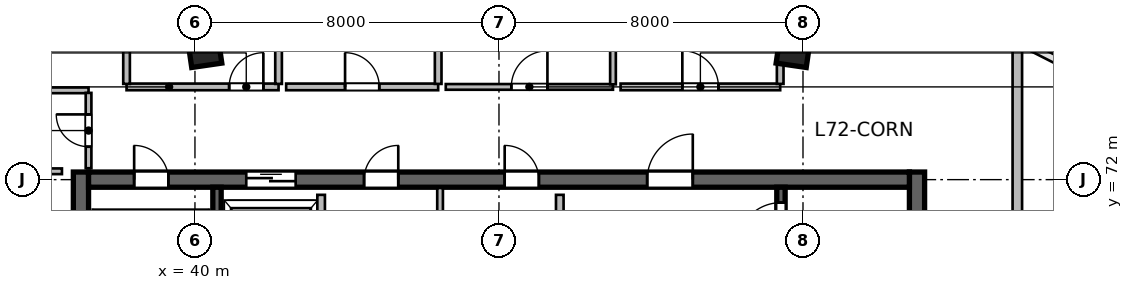
"""IFC4 building model, lengths in metres.
Left out: names, types, materials, properties, quantities, classifications, styles, units other than length and angle.
Written with IfcOpenShell. Run it as: python <this file> out.ifc"""

import sys

from ifc_helpers import new_model, si_unit, direction, frame, frame_2d, origin, origin_2d, place, context, subcontext, project, spatial, rectangle, extrude, source, transform, mapped, element, fill, save


model = new_model("IFC4")
c1 = context("Model", 3, precision=1e-05, world=origin(), true_north=direction((0.0, 1.0)))
c2 = subcontext(c1, "Body", "Model", "MODEL_VIEW")
j1 = project(units=[si_unit("LENGTHUNIT", "METRE"), si_unit("PLANEANGLEUNIT", "RADIAN")], contexts=[c1])
p1 = place(None, origin())
s1 = spatial("IfcSite", under=j1, at=p1, CompositionType="ELEMENT")
p2 = place(p1, origin())
s2 = spatial("IfcBuilding", under=s1, at=p2, CompositionType="ELEMENT")
p3 = place(p2, frame((0.0, 0.0, 295.2)))
s3 = spatial("IfcBuildingStorey", under=s2, at=p3, CompositionType="ELEMENT", Elevation=295.2)
m1 = source(origin(), c2, "Body", "SweptSolid", [
    extrude(rectangle(XDim=12.0, YDim=0.4, at=frame_2d((6.0, 0.0))), origin(), (0.0, 0.0, 1.0), 3.9),
])
for number, where, z_axis, x_axis in (
    (1, (37.0, 60.2, 0.0), (0.0, 0.0, 1.0), (0.0, 1.0, 0.0)),
    (2, (59.0, 60.2, 0.0), (0.0, 0.0, 1.0), (0.0, 1.0, 0.0)),
):
    element("IfcWall", number, at=place(p3, frame(where, z_axis=z_axis, x_axis=x_axis)), inside=s3, PredefinedType="SHEAR", context=c2, shape_type="MappedRepresentation", body=[
        mapped(m1, transform((0.0, 0.0, 0.0), scale=1.0)),
    ])
m2 = source(origin(), c2, "Body", "SweptSolid", [
    extrude(rectangle(XDim=21.6, YDim=0.4, at=frame_2d((10.8, 0.0))), origin(), (0.0, 0.0, 1.0), 3.9),
])
p4 = place(p3, frame((37.2, 72.0, 0.0), z_axis=(0.0, 0.0, 1.0), x_axis=(1.0, 0.0, 0.0)))
e3 = element("IfcWall", 3, at=p4, inside=s3, PredefinedType="SHEAR", context=c2, shape_type="MappedRepresentation", body=[
    mapped(m2, transform((0.0, 0.0, 0.0), scale=1.0)),
])
p5 = place(p4, frame((1.2, 0.0, 0.0)))
e4 = element("IfcOpeningElement", 4, at=p5, cuts=e3, PredefinedType="OPENING", context=c2, shape_type="SweptSolid", body=[
    extrude(rectangle(XDim=0.9, YDim=2.1, at=frame_2d((0.45, 1.05))), frame((0.0, 0.21, 0.0), z_axis=(0.0, -1.0, 0.0), x_axis=(1.0, 0.0, 0.0)), (0.0, 0.0, 1.0), 0.42),
])
p6 = place(p4, frame((14.7, 0.0, 0.0)))
e5 = element("IfcOpeningElement", 5, at=p6, cuts=e3, PredefinedType="OPENING", context=c2, shape_type="SweptSolid", body=[
    extrude(rectangle(XDim=1.2, YDim=2.15, at=frame_2d((0.6, 1.075))), frame((0.0, 0.21, 0.0), z_axis=(0.0, -1.0, 0.0), x_axis=(1.0, 0.0, 0.0)), (0.0, 0.0, 1.0), 0.42),
])
p7 = place(p4, frame((4.15, 0.0, 0.0)))
e6 = element("IfcOpeningElement", 6, at=p7, cuts=e3, PredefinedType="OPENING", context=c2, shape_type="SweptSolid", body=[
    extrude(rectangle(XDim=1.3, YDim=2.15, at=frame_2d((0.65, 1.075))), frame((0.0, 0.21, 0.0), z_axis=(0.0, -1.0, 0.0), x_axis=(1.0, 0.0, 0.0)), (0.0, 0.0, 1.0), 0.42),
])
p8 = place(p4, frame((7.25, 0.0, 0.0)))
e7 = element("IfcOpeningElement", 7, at=p8, cuts=e3, PredefinedType="OPENING", context=c2, shape_type="SweptSolid", body=[
    extrude(rectangle(XDim=0.9, YDim=2.1, at=frame_2d((0.45, 1.05))), frame((0.0, 0.21, 0.0), z_axis=(0.0, -1.0, 0.0), x_axis=(1.0, 0.0, 0.0)), (0.0, 0.0, 1.0), 0.42),
])
p9 = place(p4, frame((10.95, 0.0, 0.0)))
e8 = element("IfcOpeningElement", 8, at=p9, cuts=e3, PredefinedType="OPENING", context=c2, shape_type="SweptSolid", body=[
    extrude(rectangle(XDim=0.9, YDim=2.1, at=frame_2d((0.45, 1.05))), frame((0.0, 0.21, 0.0), z_axis=(0.0, -1.0, 0.0), x_axis=(1.0, 0.0, 0.0)), (0.0, 0.0, 1.0), 0.42),
])
m3 = source(origin(), c2, "Body", "SweptSolid", [
    extrude(rectangle(XDim=11.2, YDim=0.22, at=frame_2d((5.6, 0.0))), origin(), (0.0, 0.0, 1.0), 3.9),
])
p10 = place(p3, frame((40.58, 60.6, 0.0), z_axis=(0.0, 0.0, 1.0), x_axis=(0.0, 1.0, 0.0)))
e9 = element("IfcWall", 9, at=p10, inside=s3, PredefinedType="SHEAR", context=c2, shape_type="MappedRepresentation", body=[
    mapped(m3, transform((0.0, 0.0, 0.0), scale=1.0)),
])
p11 = place(p3, frame((55.42, 60.6, 0.0), z_axis=(0.0, 0.0, 1.0), x_axis=(0.0, 1.0, 0.0)))
e10 = element("IfcWall", 10, at=p11, inside=s3, PredefinedType="SHEAR", context=c2, shape_type="MappedRepresentation", body=[
    mapped(m3, transform((0.0, 0.0, 0.0), scale=1.0)),
])
p12 = place(p11, frame((9.645, 0.0, 0.0)))
e11 = element("IfcOpeningElement", 11, at=p12, cuts=e10, PredefinedType="OPENING", context=c2, shape_type="SweptSolid", body=[
    extrude(rectangle(XDim=1.15, YDim=2.15, at=frame_2d((0.575, 1.075))), frame((0.0, 0.12, 0.0), z_axis=(0.0, -1.0, 0.0), x_axis=(1.0, 0.0, 0.0)), (0.0, 0.0, 1.0), 0.24),
])
m4 = source(origin(), c2, "Body", "SweptSolid", [
    extrude(rectangle(XDim=0.8, YDim=0.8, at=origin_2d()), origin(), (0.0, 0.0, 1.0), 3.9),
])
for number, where, z_axis, x_axis in (
    (12, (40.253, 75.404, 0.0), (0.0, 0.0, 1.0), (-0.143, 0.99, 0.0)),
    (13, (55.747, 75.404, 0.0), (0.0, 0.0, 1.0), (0.143, 0.99, 0.0)),
):
    element("IfcColumn", number, at=place(p3, frame(where, z_axis=z_axis, x_axis=x_axis)), inside=s3, PredefinedType="COLUMN", context=c2, shape_type="MappedRepresentation", body=[
        mapped(m4, transform((0.0, 0.0, 0.0), scale=1.0)),
    ])
m5 = source(origin(), c2, "Body", "SweptSolid", [
    extrude(rectangle(XDim=2.673, YDim=0.28, at=frame_2d((1.337, 0.0))), origin(), (0.0, 0.0, 1.0), 3.64),
])
p13 = place(p3, frame((33.907, 75.458, 0.0), z_axis=(0.0, 0.0, 1.0), x_axis=(0.919036345912, 0.394172798266, 0.0)))
e14 = element("IfcWall", 14, at=p13, inside=s3, PredefinedType="SOLIDWALL", context=c2, shape_type="MappedRepresentation", body=[
    mapped(m5, transform((0.0, 0.0, 0.0), scale=1.0)),
])
m6 = source(origin(), c2, "Body", "SweptSolid", [
    extrude(rectangle(XDim=5.8, YDim=0.2, at=frame_2d((2.9, 0.0))), origin(), (0.0, 0.0, 1.0), 3.64),
])
p14 = place(p3, frame((49.6, 65.8, 0.0), z_axis=(0.0, 0.0, 1.0), x_axis=(0.0, 1.0, 0.0)))
e15 = element("IfcWall", 15, at=p14, inside=s3, PredefinedType="SOLIDWALL", context=c2, shape_type="MappedRepresentation", body=[
    mapped(m6, transform((0.0, 0.0, 0.0), scale=1.0)),
])
m7 = source(origin(), c2, "Body", "SweptSolid", [
    extrude(rectangle(XDim=3.2, YDim=0.2, at=frame_2d((1.6, 0.0))), origin(), (0.0, 0.0, 1.0), 3.64),
])
p15 = place(p3, frame((43.32, 68.4, 0.0), z_axis=(0.0, 0.0, 1.0), x_axis=(0.0, 1.0, 0.0)))
e16 = element("IfcWall", 16, at=p15, inside=s3, PredefinedType="SOLIDWALL", context=c2, shape_type="MappedRepresentation", body=[
    mapped(m7, transform((0.0, 0.0, 0.0), scale=1.0)),
])
m8 = source(origin(), c2, "Body", "SweptSolid", [
    extrude(rectangle(XDim=3.38, YDim=0.15, at=frame_2d((1.69, 0.0))), origin(), (0.0, 0.0, 1.0), 3.64),
])
p16 = place(p3, frame((46.45, 68.4, 0.0), z_axis=(0.0, 0.0, 1.0), x_axis=(0.0, 1.0, 0.0)))
e17 = element("IfcWall", 17, at=p16, inside=s3, PredefinedType="PARTITIONING", context=c2, shape_type="MappedRepresentation", body=[
    mapped(m8, transform((0.0, 0.0, 0.0), scale=1.0)),
])
m9 = source(origin(), c2, "Body", "SweptSolid", [
    extrude(rectangle(XDim=2.1, YDim=0.15, at=frame_2d((1.05, 0.0))), origin(), (0.0, 0.0, 1.0), 3.64),
])
p17 = place(p3, frame((34.4, 72.22, 0.0), z_axis=(0.0, 0.0, 1.0), x_axis=(1.0, 0.0, 0.0)))
e18 = element("IfcWall", 18, at=p17, inside=s3, PredefinedType="PARTITIONING", context=c2, shape_type="MappedRepresentation", body=[
    mapped(m9, transform((0.0, 0.0, 0.0), scale=1.0)),
])
m10 = source(origin(), c2, "Body", "SweptSolid", [
    extrude(rectangle(XDim=2.8, YDim=0.15, at=frame_2d((1.4, 0.0))), origin(), (0.0, 0.0, 1.0), 3.64),
])
p18 = place(p3, frame((34.4, 74.35, 0.0), z_axis=(0.0, 0.0, 1.0), x_axis=(1.0, 0.0, 0.0)))
e19 = element("IfcWall", 19, at=p18, inside=s3, PredefinedType="PARTITIONING", context=c2, shape_type="MappedRepresentation", body=[
    mapped(m10, transform((0.0, 0.0, 0.0), scale=1.0)),
])
m11 = source(origin(), c2, "Body", "SweptSolid", [
    extrude(rectangle(XDim=1.982, YDim=0.15, at=frame_2d((0.991, 0.0))), origin(), (0.0, 0.0, 1.0), 3.64),
])
p19 = place(p3, frame((37.2, 72.3, 0.0), z_axis=(0.0, 0.0, 1.0), x_axis=(0.0, 1.0, 0.0)))
e20 = element("IfcWall", 20, at=p19, inside=s3, PredefinedType="PARTITIONING", context=c2, shape_type="MappedRepresentation", body=[
    mapped(m11, transform((0.0, 0.0, 0.0), scale=1.0)),
])
p20 = place(p19, frame((0.566, 0.0, 0.0)))
e21 = element("IfcOpeningElement", 21, at=p20, cuts=e20, PredefinedType="OPENING", context=c2, shape_type="SweptSolid", body=[
    extrude(rectangle(XDim=0.85, YDim=2.1, at=frame_2d((0.425, 1.05))), frame((0.0, 0.085, 0.0), z_axis=(0.0, -1.0, 0.0), x_axis=(1.0, 0.0, 0.0)), (0.0, 0.0, 1.0), 0.17),
])
m12 = source(origin(), c2, "Body", "SweptSolid", [
    extrude(rectangle(XDim=4.0, YDim=0.175, at=frame_2d((2.0, 0.0))), origin(), (0.0, 0.0, 1.0), 3.64),
])
p21 = place(p3, frame((38.2, 74.44, 0.0), z_axis=(0.0, 0.0, 1.0), x_axis=(1.0, 0.0, 0.0)))
e22 = element("IfcWall", 22, at=p21, inside=s3, PredefinedType="PARTITIONING", context=c2, shape_type="MappedRepresentation", body=[
    mapped(m12, transform((0.0, 0.0, 0.0), scale=1.0)),
])
p22 = place(p21, frame((2.7, 0.0, 0.0)))
e23 = element("IfcOpeningElement", 23, at=p22, cuts=e22, PredefinedType="OPENING", context=c2, shape_type="SweptSolid", body=[
    extrude(rectangle(XDim=0.9, YDim=2.08, at=frame_2d((0.45, 1.04))), frame((0.0, 0.098, 0.0), z_axis=(0.0, -1.0, 0.0), x_axis=(1.0, 0.0, 0.0)), (0.0, 0.0, 1.0), 0.195),
])
m13 = source(origin(), c2, "Body", "SweptSolid", [
    extrude(rectangle(XDim=2.403, YDim=0.175, at=frame_2d((1.201, 0.0))), origin(), (0.0, 0.0, 1.0), 3.64),
])
for number, where, z_axis, x_axis in (
    (24, (38.2, 74.519, 0.0), (0.0, 0.0, 1.0), (0.0, 1.0, 0.0)),
    (25, (42.2, 74.519, 0.0), (0.0, 0.0, 1.0), (0.0, 1.0, 0.0)),
):
    element("IfcWall", number, at=place(p3, frame(where, z_axis=z_axis, x_axis=x_axis)), inside=s3, PredefinedType="PARTITIONING", context=c2, shape_type="MappedRepresentation", body=[
        mapped(m13, transform((0.0, 0.0, 0.0), scale=1.0)),
    ])
p23 = place(p3, frame((42.4, 74.44, 0.0), z_axis=(0.0, 0.0, 1.0), x_axis=(1.0, 0.0, 0.0)))
e26 = element("IfcWall", 26, at=p23, inside=s3, PredefinedType="PARTITIONING", context=c2, shape_type="MappedRepresentation", body=[
    mapped(m12, transform((0.0, 0.0, 0.0), scale=1.0)),
])
p24 = place(p23, frame((1.55, 0.0, 0.0)))
e27 = element("IfcOpeningElement", 27, at=p24, cuts=e26, PredefinedType="OPENING", context=c2, shape_type="SweptSolid", body=[
    extrude(rectangle(XDim=0.9, YDim=2.08, at=frame_2d((0.45, 1.04))), frame((0.0, 0.098, 0.0), z_axis=(0.0, -1.0, 0.0), x_axis=(1.0, 0.0, 0.0)), (0.0, 0.0, 1.0), 0.195),
])
p25 = place(p3, frame((46.4, 74.519, 0.0), z_axis=(0.0, 0.0, 1.0), x_axis=(0.0, 1.0, 0.0)))
e28 = element("IfcWall", 28, at=p25, inside=s3, PredefinedType="PARTITIONING", context=c2, shape_type="MappedRepresentation", body=[
    mapped(m13, transform((0.0, 0.0, 0.0), scale=1.0)),
])
m14 = source(origin(), c2, "Body", "SweptSolid", [
    extrude(rectangle(XDim=4.4, YDim=0.15, at=frame_2d((2.2, 0.0))), origin(), (0.0, 0.0, 1.0), 3.64),
])
p26 = place(p3, frame((46.6, 74.44, 0.0), z_axis=(0.0, 0.0, 1.0), x_axis=(1.0, 0.0, 0.0)))
e29 = element("IfcWall", 29, at=p26, inside=s3, PredefinedType="PARTITIONING", context=c2, shape_type="MappedRepresentation", body=[
    mapped(m14, transform((0.0, 0.0, 0.0), scale=1.0)),
])
p27 = place(p26, frame((1.725, 0.0, 0.0)))
e30 = element("IfcOpeningElement", 30, at=p27, cuts=e29, PredefinedType="OPENING", context=c2, shape_type="SweptSolid", body=[
    extrude(rectangle(XDim=0.95, YDim=2.1, at=frame_2d((0.475, 1.05))), frame((0.0, 0.085, 0.0), z_axis=(0.0, -1.0, 0.0), x_axis=(1.0, 0.0, 0.0)), (0.0, 0.0, 1.0), 0.17),
])
m15 = source(origin(), c2, "Body", "SweptSolid", [
    extrude(rectangle(XDim=2.425, YDim=0.15, at=frame_2d((1.212, 0.0))), origin(), (0.0, 0.0, 1.0), 3.64),
])
p28 = place(p3, frame((51.0, 74.508, 0.0), z_axis=(0.0, 0.0, 1.0), x_axis=(0.0, 1.0, 0.0)))
e31 = element("IfcWall", 31, at=p28, inside=s3, PredefinedType="PARTITIONING", context=c2, shape_type="MappedRepresentation", body=[
    mapped(m15, transform((0.0, 0.0, 0.0), scale=1.0)),
])
m16 = source(origin(), c2, "Body", "SweptSolid", [
    extrude(rectangle(XDim=4.2, YDim=0.175, at=frame_2d((2.1, 0.0))), origin(), (0.0, 0.0, 1.0), 3.64),
])
p29 = place(p3, frame((51.2, 74.44, 0.0), z_axis=(0.0, 0.0, 1.0), x_axis=(1.0, 0.0, 0.0)))
e32 = element("IfcWall", 32, at=p29, inside=s3, PredefinedType="PARTITIONING", context=c2, shape_type="MappedRepresentation", body=[
    mapped(m16, transform((0.0, 0.0, 0.0), scale=1.0)),
])
p30 = place(p29, frame((1.625, 0.0, 0.0)))
e33 = element("IfcOpeningElement", 33, at=p30, cuts=e32, PredefinedType="OPENING", context=c2, shape_type="SweptSolid", body=[
    extrude(rectangle(XDim=0.95, YDim=2.12, at=frame_2d((0.475, 1.06))), frame((0.0, 0.098, 0.0), z_axis=(0.0, -1.0, 0.0), x_axis=(1.0, 0.0, 0.0)), (0.0, 0.0, 1.0), 0.195),
])
p31 = place(p3, frame((55.4, 74.519, 0.0), z_axis=(0.0, 0.0, 1.0), x_axis=(0.0, 1.0, 0.0)))
e34 = element("IfcWall", 34, at=p31, inside=s3, PredefinedType="PARTITIONING", context=c2, shape_type="MappedRepresentation", body=[
    mapped(m13, transform((0.0, 0.0, 0.0), scale=1.0)),
])
m17 = source(origin(), c2, "Body", "SweptSolid", [
    extrude(rectangle(XDim=10.153, YDim=0.25, at=frame_2d((5.077, 0.0))), origin(), (0.0, 0.0, 1.0), 3.64),
])
p32 = place(p3, frame((61.64, 65.5, 0.0), z_axis=(0.0, 0.0, 1.0), x_axis=(0.0, 1.0, 0.0)))
e35 = element("IfcWall", 35, at=p32, inside=s3, PredefinedType="PARTITIONING", context=c2, shape_type="MappedRepresentation", body=[
    mapped(m17, transform((0.0, 0.0, 0.0), scale=1.0)),
])
p33 = place(p32, frame((4.602, 0.0, 0.0)))
e36 = element("IfcOpeningElement", 36, at=p33, cuts=e35, PredefinedType="OPENING", context=c2, shape_type="SweptSolid", body=[
    extrude(rectangle(XDim=0.95, YDim=2.1, at=frame_2d((0.475, 1.05))), frame((0.0, 0.135, 0.0), z_axis=(0.0, -1.0, 0.0), x_axis=(1.0, 0.0, 0.0)), (0.0, 0.0, 1.0), 0.27),
])
m18 = source(origin(), c2, "Body", "SweptSolid", [
    extrude(rectangle(XDim=0.9, YDim=2.1, at=frame_2d((0.45, 1.05))), frame((0.0, 0.025, 0.0), z_axis=(0.0, -1.0, 0.0), x_axis=(1.0, 0.0, 0.0)), (0.0, 0.0, 1.0), 0.05),
])
p34 = place(p5, origin())
e37 = element("IfcDoor", 37, at=p34, inside=s3, OperationType="SINGLE_SWING_LEFT", PredefinedType="DOOR", context=c2, shape_type="MappedRepresentation", body=[
    mapped(m18, transform((0.0, 0.0, 0.0), scale=1.0)),
])
fill(e4, e37)
m19 = source(origin(), c2, "Body", "SweptSolid", [
    extrude(rectangle(XDim=1.15, YDim=2.15, at=frame_2d((0.575, 1.075))), frame((0.0, 0.025, 0.0), z_axis=(0.0, -1.0, 0.0), x_axis=(1.0, 0.0, 0.0)), (0.0, 0.0, 1.0), 0.05),
])
p35 = place(p12, origin())
e38 = element("IfcDoor", 38, at=p35, inside=s3, OperationType="SINGLE_SWING_LEFT", PredefinedType="DOOR", context=c2, shape_type="MappedRepresentation", body=[
    mapped(m19, transform((0.0, 0.0, 0.0), scale=1.0)),
])
fill(e11, e38)
m20 = source(origin(), c2, "Body", "SweptSolid", [
    extrude(rectangle(XDim=1.2, YDim=2.15, at=frame_2d((0.6, 1.075))), frame((0.0, 0.025, 0.0), z_axis=(0.0, -1.0, 0.0), x_axis=(1.0, 0.0, 0.0)), (0.0, 0.0, 1.0), 0.05),
])
p36 = place(p6, origin())
e39 = element("IfcDoor", 39, at=p36, inside=s3, OperationType="SINGLE_SWING_RIGHT", PredefinedType="DOOR", context=c2, shape_type="MappedRepresentation", body=[
    mapped(m20, transform((0.0, 0.0, 0.0), scale=1.0)),
])
fill(e5, e39)
m21 = source(origin(), c2, "Body", "SweptSolid", [
    extrude(rectangle(XDim=1.3, YDim=2.15, at=frame_2d((0.65, 1.075))), frame((0.0, 0.025, 0.0), z_axis=(0.0, -1.0, 0.0), x_axis=(1.0, 0.0, 0.0)), (0.0, 0.0, 1.0), 0.05),
])
p37 = place(p7, origin())
e40 = element("IfcDoor", 40, at=p37, inside=s3, OperationType="DOUBLE_DOOR_SLIDING", PredefinedType="DOOR", context=c2, shape_type="MappedRepresentation", body=[
    mapped(m21, transform((0.0, 0.0, 0.0), scale=1.0)),
])
fill(e6, e40)
p38 = place(p8, origin())
e41 = element("IfcDoor", 41, at=p38, inside=s3, OperationType="SINGLE_SWING_RIGHT", PredefinedType="DOOR", context=c2, shape_type="MappedRepresentation", body=[
    mapped(m18, transform((0.0, 0.0, 0.0), scale=1.0)),
])
fill(e7, e41)
p39 = place(p9, origin())
e42 = element("IfcDoor", 42, at=p39, inside=s3, OperationType="SINGLE_SWING_LEFT", PredefinedType="DOOR", context=c2, shape_type="MappedRepresentation", body=[
    mapped(m18, transform((0.0, 0.0, 0.0), scale=1.0)),
])
fill(e8, e42)
m22 = source(origin(), c2, "Body", "SweptSolid", [
    extrude(rectangle(XDim=0.85, YDim=2.1, at=frame_2d((0.425, 1.05))), frame((0.0, 0.025, 0.0), z_axis=(0.0, -1.0, 0.0), x_axis=(1.0, 0.0, 0.0)), (0.0, 0.0, 1.0), 0.05),
])
p40 = place(p20, origin())
e43 = element("IfcDoor", 43, at=p40, inside=s3, OperationType="SINGLE_SWING_RIGHT", PredefinedType="DOOR", context=c2, shape_type="MappedRepresentation", body=[
    mapped(m22, transform((0.0, 0.0, 0.0), scale=1.0)),
])
fill(e21, e43)
m23 = source(origin(), c2, "Body", "SweptSolid", [
    extrude(rectangle(XDim=0.9, YDim=2.08, at=frame_2d((0.45, 1.04))), frame((0.0, 0.025, 0.0), z_axis=(0.0, -1.0, 0.0), x_axis=(1.0, 0.0, 0.0)), (0.0, 0.0, 1.0), 0.05),
])
p41 = place(p22, origin())
e44 = element("IfcDoor", 44, at=p41, inside=s3, OperationType="SINGLE_SWING_RIGHT", PredefinedType="DOOR", context=c2, shape_type="MappedRepresentation", body=[
    mapped(m23, transform((0.0, 0.0, 0.0), scale=1.0)),
])
fill(e23, e44)
p42 = place(p24, origin())
e45 = element("IfcDoor", 45, at=p42, inside=s3, OperationType="SINGLE_SWING_LEFT", PredefinedType="DOOR", context=c2, shape_type="MappedRepresentation", body=[
    mapped(m23, transform((0.0, 0.0, 0.0), scale=1.0)),
])
fill(e27, e45)
m24 = source(origin(), c2, "Body", "SweptSolid", [
    extrude(rectangle(XDim=0.95, YDim=2.1, at=frame_2d((0.475, 1.05))), frame((0.0, 0.025, 0.0), z_axis=(0.0, -1.0, 0.0), x_axis=(1.0, 0.0, 0.0)), (0.0, 0.0, 1.0), 0.05),
])
p43 = place(p27, origin())
e46 = element("IfcDoor", 46, at=p43, inside=s3, OperationType="SINGLE_SWING_RIGHT", PredefinedType="DOOR", context=c2, shape_type="MappedRepresentation", body=[
    mapped(m24, transform((0.0, 0.0, 0.0), scale=1.0)),
])
fill(e30, e46)
m25 = source(origin(), c2, "Body", "SweptSolid", [
    extrude(rectangle(XDim=0.95, YDim=2.12, at=frame_2d((0.475, 1.06))), frame((0.0, 0.025, 0.0), z_axis=(0.0, -1.0, 0.0), x_axis=(1.0, 0.0, 0.0)), (0.0, 0.0, 1.0), 0.05),
])
p44 = place(p30, origin())
e47 = element("IfcDoor", 47, at=p44, inside=s3, OperationType="SINGLE_SWING_LEFT", PredefinedType="DOOR", context=c2, shape_type="MappedRepresentation", body=[
    mapped(m25, transform((0.0, 0.0, 0.0), scale=1.0)),
])
fill(e33, e47)
save(model, sys.argv[1])
